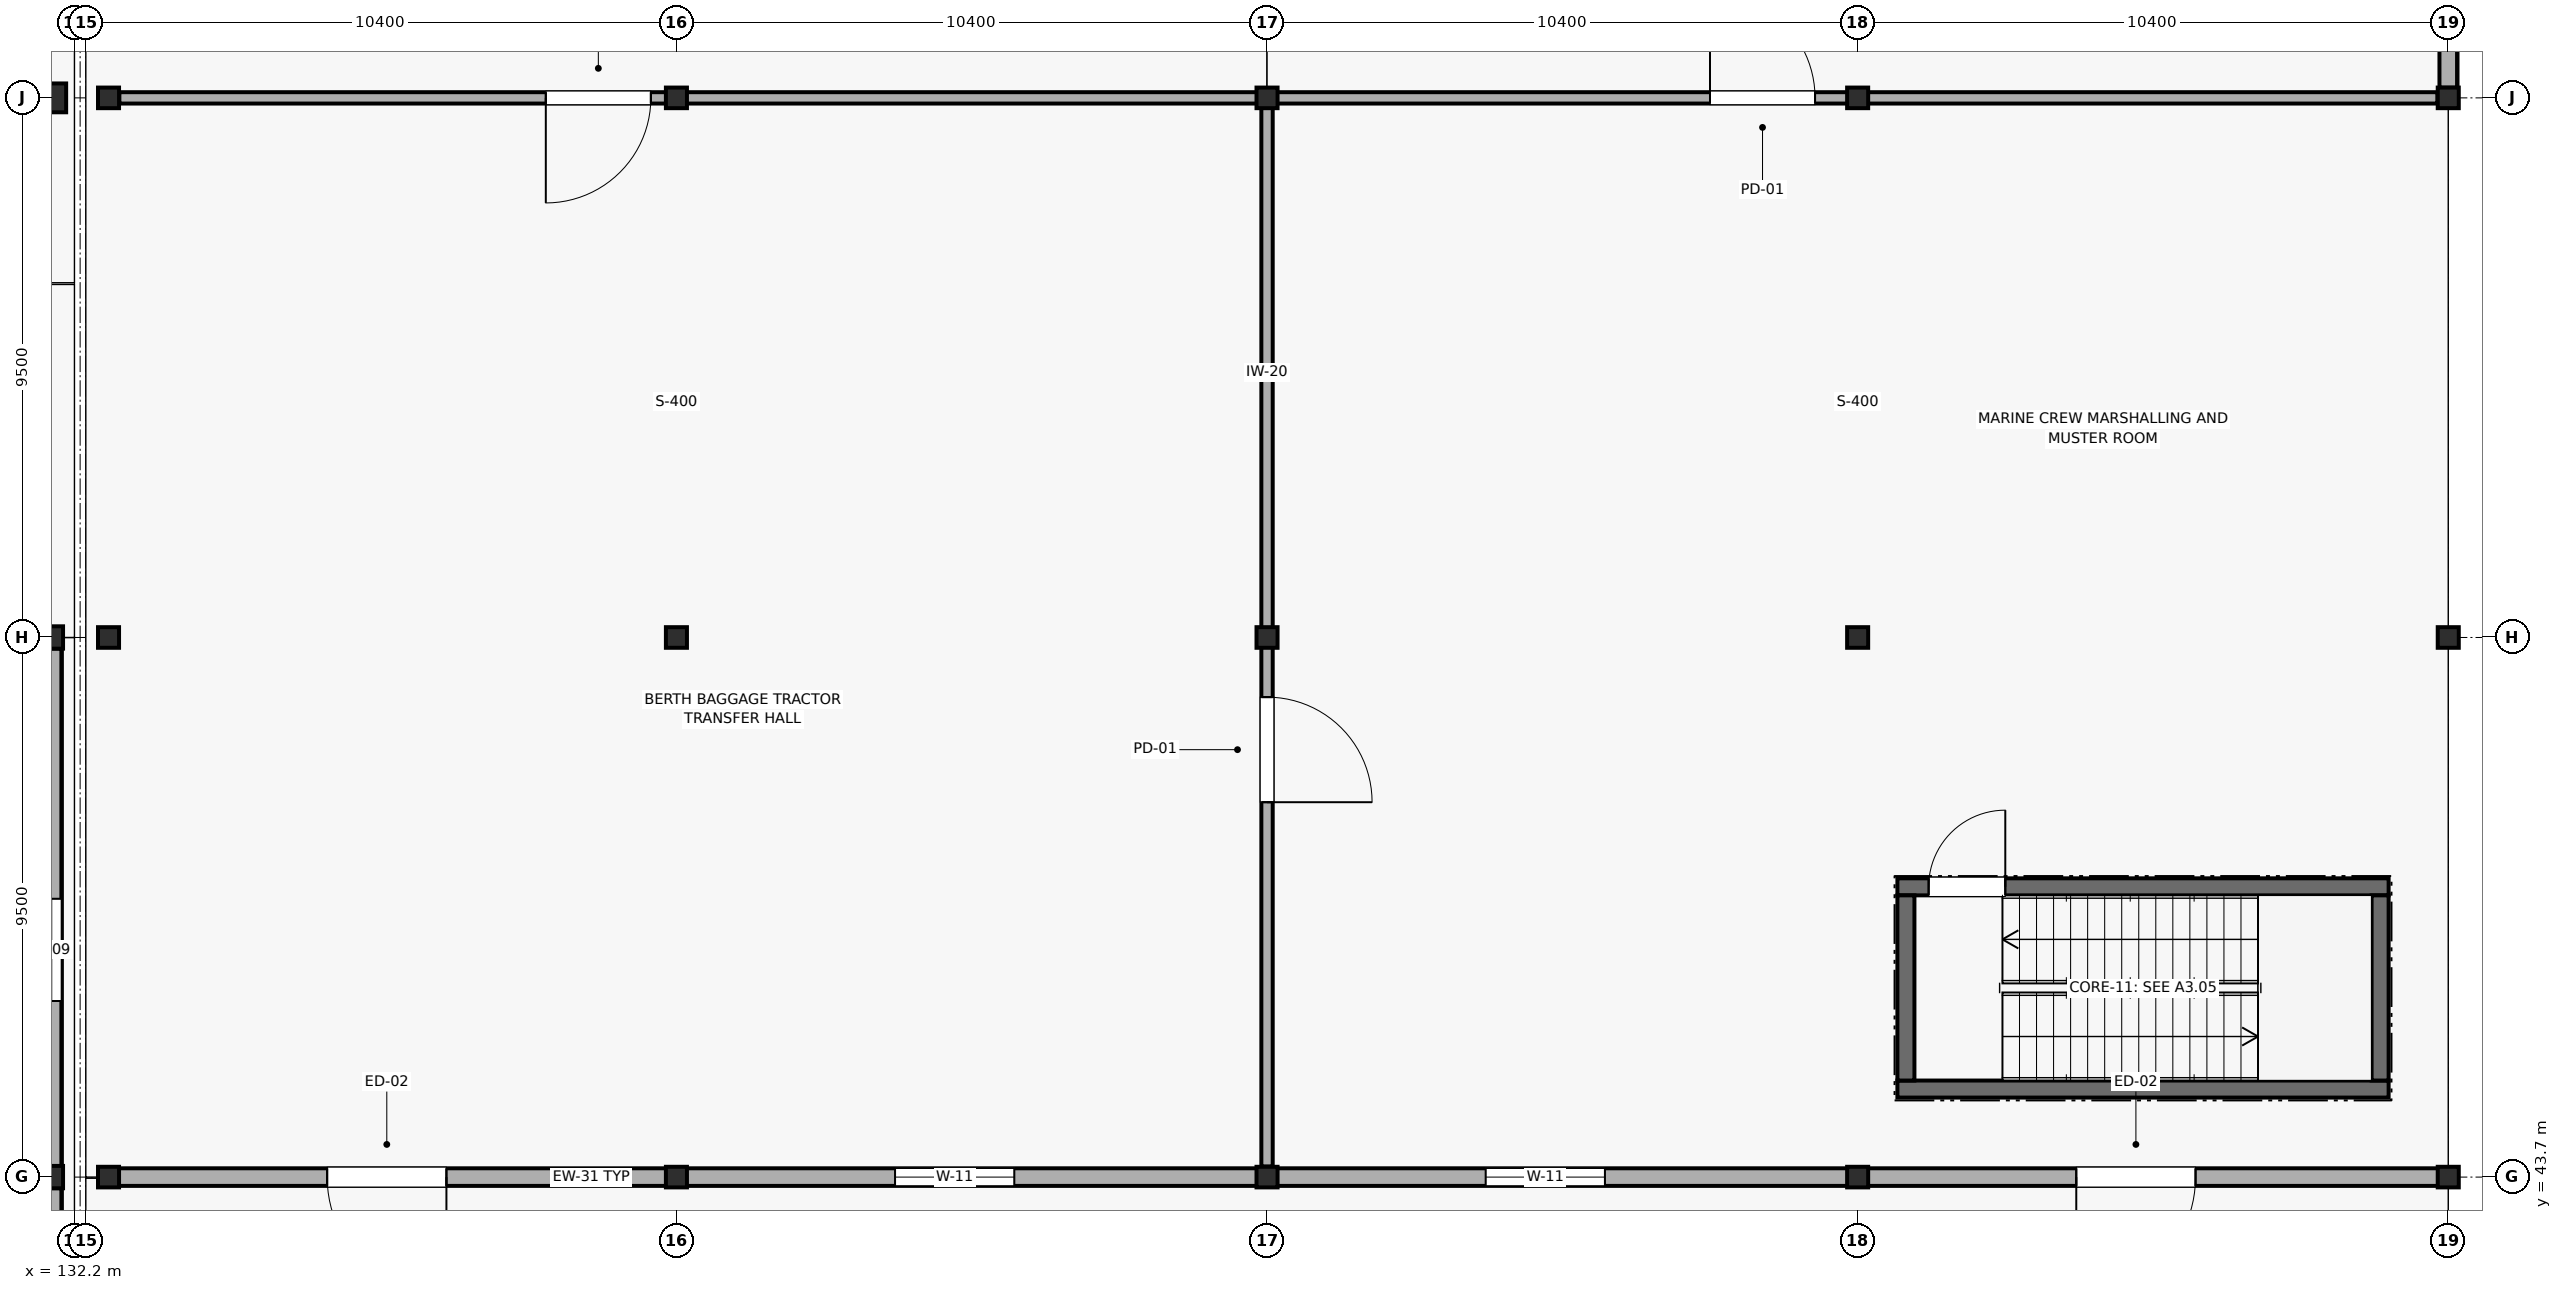
"""IFC4 building model, lengths in metres.
Left out: names, types, materials, properties, quantities, classifications, styles, units other than length and angle.
Written with IfcOpenShell. Run it as: python <this file> out.ifc"""

import sys

from ifc_helpers import new_model, si_unit, direction, frame, frame_2d, origin, origin_2d, place, context, subcontext, project, spatial, rectangle, hollow_circle, i_section, extrude, element, fill, save


model = new_model("IFC4")
c1 = context("Model", 3, precision=1e-05, world=origin(), true_north=direction((0.0, 1.0)))
c2 = subcontext(c1, "Body", "Model", "MODEL_VIEW")
j1 = project(units=[si_unit("LENGTHUNIT", "METRE"), si_unit("PLANEANGLEUNIT", "RADIAN")], contexts=[c1])
p1 = place(None, origin())
s1 = spatial("IfcSite", under=j1, at=p1, CompositionType="ELEMENT")
p2 = place(p1, origin())
s2 = spatial("IfcBuilding", under=s1, at=p2, CompositionType="ELEMENT")
p3 = place(p2, origin())
s3 = spatial("IfcBuildingStorey", under=s2, at=p3, CompositionType="ELEMENT", Elevation=0.0)
p4 = place(p3, frame((131.8, 62.7, 0.0), z_axis=(0.0, 0.0, 1.0), x_axis=(1.0, 0.0, 0.0)))
e1 = element("IfcColumn", 1, at=p4, inside=s3, PredefinedType="COLUMN", context=c2, shape_type="SweptSolid", body=[
    extrude(hollow_circle(Radius=0.254, WallThickness=0.012, at=origin_2d()), origin(), (0.0, 0.0, 1.0), 5.4),
])
for number, where, z_axis, x_axis in (
    (2, (131.8, 43.7, 0.0), (0.0, 0.0, 1.0), (1.0, 0.0, 0.0)),
    (3, (131.8, 53.2, 0.0), (0.0, 0.0, 1.0), (1.0, 0.0, 0.0)),
):
    element("IfcColumn", number, at=place(p3, frame(where, z_axis=z_axis, x_axis=x_axis)), inside=s3, PredefinedType="COLUMN", context=c2, shape_type="SweptSolid", body=[
        extrude(i_section(OverallWidth=0.399, OverallDepth=0.394, WebThickness=0.023, FlangeThickness=0.037, FilletRadius=0.018, at=origin_2d()), origin(), (0.0, 0.0, 1.0), 5.4),
    ])
for number, where, z_axis, x_axis in (
    (4, (132.8, 43.7, 0.0), (0.0, 0.0, 1.0), (1.0, 0.0, 0.0)),
    (5, (132.8, 53.2, 0.0), (0.0, 0.0, 1.0), (1.0, 0.0, 0.0)),
    (6, (132.8, 62.7, 0.0), (0.0, 0.0, 1.0), (1.0, 0.0, 0.0)),
    (7, (142.8, 43.7, 0.0), (0.0, 0.0, 1.0), (1.0, 0.0, 0.0)),
    (8, (142.8, 53.2, 0.0), (0.0, 0.0, 1.0), (1.0, 0.0, 0.0)),
    (9, (142.8, 62.7, 0.0), (0.0, 0.0, 1.0), (1.0, 0.0, 0.0)),
    (10, (153.2, 43.7, 0.0), (0.0, 0.0, 1.0), (1.0, 0.0, 0.0)),
    (11, (153.2, 53.2, 0.0), (0.0, 0.0, 1.0), (1.0, 0.0, 0.0)),
    (12, (153.2, 62.7, 0.0), (0.0, 0.0, 1.0), (1.0, 0.0, 0.0)),
    (13, (163.6, 43.7, 0.0), (0.0, 0.0, 1.0), (1.0, 0.0, 0.0)),
    (14, (163.6, 53.2, 0.0), (0.0, 0.0, 1.0), (1.0, 0.0, 0.0)),
    (15, (163.6, 62.7, 0.0), (0.0, 0.0, 1.0), (1.0, 0.0, 0.0)),
    (16, (174.0, 43.7, 0.0), (0.0, 0.0, 1.0), (1.0, 0.0, 0.0)),
    (17, (174.0, 53.2, 0.0), (0.0, 0.0, 1.0), (1.0, 0.0, 0.0)),
    (18, (174.0, 62.7, 0.0), (0.0, 0.0, 1.0), (1.0, 0.0, 0.0)),
):
    element("IfcColumn", number, at=place(p3, frame(where, z_axis=z_axis, x_axis=x_axis)), inside=s3, PredefinedType="COLUMN", context=c2, shape_type="SweptSolid", body=[
        extrude(i_section(OverallWidth=0.371, OverallDepth=0.363, WebThickness=0.013, FlangeThickness=0.022, FilletRadius=0.018, at=origin_2d()), origin(), (0.0, 0.0, 1.0), 5.4),
    ])
p5 = place(p3, frame((131.8, 34.846, 0.0), z_axis=(0.0, 0.0, 1.0), x_axis=(0.0, 1.0, 0.0)))
e19 = element("IfcWall", 19, at=p5, inside=s3, PredefinedType="SOLIDWALL", context=c2, shape_type="SweptSolid", body=[
    extrude(rectangle(XDim=8.659, YDim=0.34, at=frame_2d((4.33, 0.0))), origin(), (0.0, 0.0, 1.0), 4.483),
])
p6 = place(p5, frame((2.854, 0.0, 1.1)))
e20 = element("IfcOpeningElement", 20, at=p6, cuts=e19, PredefinedType="OPENING", context=c2, shape_type="SweptSolid", body=[
    extrude(rectangle(XDim=1.8, YDim=1.8, at=frame_2d((0.9, 0.9))), frame((0.0, 0.18, 0.0), z_axis=(0.0, -1.0, 0.0), x_axis=(1.0, 0.0, 0.0)), (0.0, 0.0, 1.0), 0.36),
])
p7 = place(p3, frame((131.8, 43.895, 0.0), z_axis=(0.0, 0.0, 1.0), x_axis=(0.0, 1.0, 0.0)))
e21 = element("IfcWall", 21, at=p7, inside=s3, PredefinedType="SOLIDWALL", context=c2, shape_type="SweptSolid", body=[
    extrude(rectangle(XDim=9.11, YDim=0.34, at=frame_2d((4.555, 0.0))), origin(), (0.0, 0.0, 1.0), 4.483),
])
p8 = place(p7, frame((2.905, 0.0, 1.1)))
e22 = element("IfcOpeningElement", 22, at=p8, cuts=e21, PredefinedType="OPENING", context=c2, shape_type="SweptSolid", body=[
    extrude(rectangle(XDim=1.8, YDim=1.8, at=frame_2d((0.9, 0.9))), frame((0.0, 0.18, 0.0), z_axis=(0.0, -1.0, 0.0), x_axis=(1.0, 0.0, 0.0)), (0.0, 0.0, 1.0), 0.36),
])
p9 = place(p3, frame((174.0, 62.88, 0.0), z_axis=(0.0, 0.0, 1.0), x_axis=(0.0, 1.0, 0.0)))
e23 = element("IfcWall", 23, at=p9, inside=s3, PredefinedType="SOLIDWALL", context=c2, shape_type="SweptSolid", body=[
    extrude(rectangle(XDim=7.541, YDim=0.31, at=frame_2d((3.771, 0.0))), origin(), (0.0, 0.0, 1.0), 4.622),
])
p10 = place(p9, frame((0.771, 0.0, 0.0)))
e24 = element("IfcOpeningElement", 24, at=p10, cuts=e23, PredefinedType="OPENING", context=c2, shape_type="SweptSolid", body=[
    extrude(rectangle(XDim=1.4, YDim=2.25, at=frame_2d((0.7, 1.125))), frame((0.0, 0.165, 0.0), z_axis=(0.0, -1.0, 0.0), x_axis=(1.0, 0.0, 0.0)), (0.0, 0.0, 1.0), 0.33),
])
p11 = place(p3, frame((132.805, 43.7, 0.0), z_axis=(0.0, 0.0, 1.0), x_axis=(1.0, 0.0, 0.0)))
e25 = element("IfcWall", 25, at=p11, inside=s3, PredefinedType="SOLIDWALL", context=c2, shape_type="SweptSolid", body=[
    extrude(rectangle(XDim=9.991, YDim=0.31, at=frame_2d((4.995, 0.0))), origin(), (0.0, 0.0, 1.0), 4.558),
])
p12 = place(p11, frame((3.845, 0.0, 0.0)))
e26 = element("IfcOpeningElement", 26, at=p12, cuts=e25, PredefinedType="OPENING", context=c2, shape_type="SweptSolid", body=[
    extrude(rectangle(XDim=2.1, YDim=2.5, at=frame_2d((1.05, 1.25))), frame((0.0, 0.165, 0.0), z_axis=(0.0, -1.0, 0.0), x_axis=(1.0, 0.0, 0.0)), (0.0, 0.0, 1.0), 0.33),
])
p13 = place(p3, frame((142.805, 43.7, 0.0), z_axis=(0.0, 0.0, 1.0), x_axis=(1.0, 0.0, 0.0)))
e27 = element("IfcWall", 27, at=p13, inside=s3, PredefinedType="SOLIDWALL", context=c2, shape_type="SweptSolid", body=[
    extrude(rectangle(XDim=10.391, YDim=0.31, at=frame_2d((5.195, 0.0))), origin(), (0.0, 0.0, 1.0), 4.558),
])
p14 = place(p13, frame((3.845, 0.0, 1.05)))
e28 = element("IfcOpeningElement", 28, at=p14, cuts=e27, PredefinedType="OPENING", context=c2, shape_type="SweptSolid", body=[
    extrude(rectangle(XDim=2.1, YDim=1.8, at=frame_2d((1.05, 0.9))), frame((0.0, 0.165, 0.0), z_axis=(0.0, -1.0, 0.0), x_axis=(1.0, 0.0, 0.0)), (0.0, 0.0, 1.0), 0.33),
])
p15 = place(p3, frame((153.205, 43.7, 0.0), z_axis=(0.0, 0.0, 1.0), x_axis=(1.0, 0.0, 0.0)))
e29 = element("IfcWall", 29, at=p15, inside=s3, PredefinedType="SOLIDWALL", context=c2, shape_type="SweptSolid", body=[
    extrude(rectangle(XDim=10.391, YDim=0.31, at=frame_2d((5.195, 0.0))), origin(), (0.0, 0.0, 1.0), 4.558),
])
p16 = place(p15, frame((3.845, 0.0, 1.05)))
e30 = element("IfcOpeningElement", 30, at=p16, cuts=e29, PredefinedType="OPENING", context=c2, shape_type="SweptSolid", body=[
    extrude(rectangle(XDim=2.1, YDim=1.8, at=frame_2d((1.05, 0.9))), frame((0.0, 0.165, 0.0), z_axis=(0.0, -1.0, 0.0), x_axis=(1.0, 0.0, 0.0)), (0.0, 0.0, 1.0), 0.33),
])
p17 = place(p3, frame((163.604, 43.7, 0.0), z_axis=(0.0, 0.0, 1.0), x_axis=(1.0, 0.0, 0.0)))
e31 = element("IfcWall", 31, at=p17, inside=s3, PredefinedType="SOLIDWALL", context=c2, shape_type="SweptSolid", body=[
    extrude(rectangle(XDim=10.391, YDim=0.31, at=frame_2d((5.195, 0.0))), origin(), (0.0, 0.0, 1.0), 4.558),
])
p18 = place(p17, frame((3.845, 0.0, 0.0)))
e32 = element("IfcOpeningElement", 32, at=p18, cuts=e31, PredefinedType="OPENING", context=c2, shape_type="SweptSolid", body=[
    extrude(rectangle(XDim=2.1, YDim=2.5, at=frame_2d((1.05, 1.25))), frame((0.0, 0.165, 0.0), z_axis=(0.0, -1.0, 0.0), x_axis=(1.0, 0.0, 0.0)), (0.0, 0.0, 1.0), 0.33),
])
p19 = place(p3, frame((164.3, 45.25, 0.0), z_axis=(0.0, 0.0, 1.0), x_axis=(1.0, 0.0, 0.0)))
e33 = element("IfcWall", 33, at=p19, inside=s3, PredefinedType="SHEAR", context=c2, shape_type="SweptSolid", body=[
    extrude(rectangle(XDim=8.65, YDim=0.3, at=frame_2d((4.325, 0.0))), origin(), (0.0, 0.0, 1.0), 5.165),
])
p20 = place(p3, frame((172.95, 48.81, 0.0), z_axis=(0.0, 0.0, 1.0), x_axis=(-1.0, 0.0, 0.0)))
e34 = element("IfcWall", 34, at=p20, inside=s3, PredefinedType="SHEAR", context=c2, shape_type="SweptSolid", body=[
    extrude(rectangle(XDim=8.65, YDim=0.3, at=frame_2d((4.325, 0.0))), origin(), (0.0, 0.0, 1.0), 5.165),
])
p21 = place(p20, frame((6.75, 0.0, 0.0)))
e35 = element("IfcOpeningElement", 35, at=p21, cuts=e34, PredefinedType="OPENING", context=c2, shape_type="SweptSolid", body=[
    extrude(rectangle(XDim=1.35, YDim=2.2, at=frame_2d((0.675, 1.1))), frame((0.0, 0.16, 0.0), z_axis=(0.0, -1.0, 0.0), x_axis=(1.0, 0.0, 0.0)), (0.0, 0.0, 1.0), 0.32),
])
for number, where, z_axis, x_axis in (
    (36, (164.45, 48.66, 0.0), (0.0, 0.0, 1.0), (0.0, -1.0, 0.0)),
    (37, (172.8, 45.4, 0.0), (0.0, 0.0, 1.0), (0.0, 1.0, 0.0)),
):
    element("IfcWall", number, at=place(p3, frame(where, z_axis=z_axis, x_axis=x_axis)), inside=s3, PredefinedType="SHEAR", context=c2, shape_type="SweptSolid", body=[
        extrude(rectangle(XDim=3.26, YDim=0.3, at=frame_2d((1.63, 0.0))), origin(), (0.0, 0.0, 1.0), 5.165),
    ])
p22 = place(p3, frame((132.99, 62.7, 0.0), z_axis=(0.0, 0.0, 1.0), x_axis=(1.0, 0.0, 0.0)))
e38 = element("IfcWall", 38, at=p22, inside=s3, PredefinedType="PARTITIONING", context=c2, shape_type="SweptSolid", body=[
    extrude(rectangle(XDim=40.819, YDim=0.2, at=frame_2d((20.41, 0.0))), origin(), (0.0, 0.0, 1.0), 4.558),
])
p23 = place(p22, frame((7.51, 0.0, 0.0)))
e39 = element("IfcOpeningElement", 39, at=p23, cuts=e38, PredefinedType="OPENING", context=c2, shape_type="SweptSolid", body=[
    extrude(rectangle(XDim=1.85, YDim=2.4, at=frame_2d((0.925, 1.2))), frame((0.0, 0.11, 0.0), z_axis=(0.0, -1.0, 0.0), x_axis=(1.0, 0.0, 0.0)), (0.0, 0.0, 1.0), 0.22),
])
p24 = place(p22, frame((28.01, 0.0, 0.0)))
e40 = element("IfcOpeningElement", 40, at=p24, cuts=e38, PredefinedType="OPENING", context=c2, shape_type="SweptSolid", body=[
    extrude(rectangle(XDim=1.85, YDim=2.4, at=frame_2d((0.925, 1.2))), frame((0.0, 0.11, 0.0), z_axis=(0.0, -1.0, 0.0), x_axis=(1.0, 0.0, 0.0)), (0.0, 0.0, 1.0), 0.22),
])
p25 = place(p3, frame((153.2, 43.887, 0.0), z_axis=(0.0, 0.0, 1.0), x_axis=(0.0, 1.0, 0.0)))
e41 = element("IfcWall", 41, at=p25, inside=s3, PredefinedType="PARTITIONING", context=c2, shape_type="SweptSolid", body=[
    extrude(rectangle(XDim=18.708, YDim=0.2, at=frame_2d((9.354, 0.0))), origin(), (0.0, 0.0, 1.0), 4.622),
])
p26 = place(p25, frame((6.413, 0.0, 0.0)))
e42 = element("IfcOpeningElement", 42, at=p26, cuts=e41, PredefinedType="OPENING", context=c2, shape_type="SweptSolid", body=[
    extrude(rectangle(XDim=1.85, YDim=2.4, at=frame_2d((0.925, 1.2))), frame((0.0, 0.11, 0.0), z_axis=(0.0, -1.0, 0.0), x_axis=(1.0, 0.0, 0.0)), (0.0, 0.0, 1.0), 0.22),
])
p27 = place(p8, origin())
e43 = element("IfcWindow", 43, at=p27, inside=s3, PartitioningType="SINGLE_PANEL", PredefinedType="WINDOW", context=c2, shape_type="SweptSolid", body=[
    extrude(rectangle(XDim=1.8, YDim=1.8, at=frame_2d((0.9, 0.9))), frame((0.0, 0.03, 0.0), z_axis=(0.0, -1.0, 0.0), x_axis=(1.0, 0.0, 0.0)), (0.0, 0.0, 1.0), 0.06),
])
fill(e22, e43)
p28 = place(p12, frame((2.1, 0.0, 0.0), z_axis=(0.0, 0.0, 1.0), x_axis=(-1.0, 0.0, 0.0)))
e44 = element("IfcDoor", 44, at=p28, inside=s3, OperationType="SINGLE_SWING_LEFT", PredefinedType="DOOR", context=c2, shape_type="SweptSolid", body=[
    extrude(rectangle(XDim=2.1, YDim=2.5, at=frame_2d((1.05, 1.25))), frame((0.0, 0.025, 0.0), z_axis=(0.0, -1.0, 0.0), x_axis=(1.0, 0.0, 0.0)), (0.0, 0.0, 1.0), 0.05),
])
fill(e26, e44)
p29 = place(p14, origin())
e45 = element("IfcWindow", 45, at=p29, inside=s3, PartitioningType="SINGLE_PANEL", PredefinedType="WINDOW", context=c2, shape_type="SweptSolid", body=[
    extrude(rectangle(XDim=2.1, YDim=1.8, at=frame_2d((1.05, 0.9))), frame((0.0, 0.03, 0.0), z_axis=(0.0, -1.0, 0.0), x_axis=(1.0, 0.0, 0.0)), (0.0, 0.0, 1.0), 0.06),
])
fill(e28, e45)
p30 = place(p16, origin())
e46 = element("IfcWindow", 46, at=p30, inside=s3, PartitioningType="SINGLE_PANEL", PredefinedType="WINDOW", context=c2, shape_type="SweptSolid", body=[
    extrude(rectangle(XDim=2.1, YDim=1.8, at=frame_2d((1.05, 0.9))), frame((0.0, 0.03, 0.0), z_axis=(0.0, -1.0, 0.0), x_axis=(1.0, 0.0, 0.0)), (0.0, 0.0, 1.0), 0.06),
])
fill(e30, e46)
p31 = place(p18, frame((2.1, 0.0, 0.0), z_axis=(0.0, 0.0, 1.0), x_axis=(-1.0, 0.0, 0.0)))
e47 = element("IfcDoor", 47, at=p31, inside=s3, OperationType="SINGLE_SWING_RIGHT", PredefinedType="DOOR", context=c2, shape_type="SweptSolid", body=[
    extrude(rectangle(XDim=2.1, YDim=2.5, at=frame_2d((1.05, 1.25))), frame((0.0, 0.025, 0.0), z_axis=(0.0, -1.0, 0.0), x_axis=(1.0, 0.0, 0.0)), (0.0, 0.0, 1.0), 0.05),
])
fill(e32, e47)
p32 = place(p21, frame((1.35, 0.0, 0.0), z_axis=(0.0, 0.0, 1.0), x_axis=(-1.0, 0.0, 0.0)))
e48 = element("IfcDoor", 48, at=p32, inside=s3, OperationType="SINGLE_SWING_RIGHT", PredefinedType="DOOR", context=c2, shape_type="SweptSolid", body=[
    extrude(rectangle(XDim=1.35, YDim=2.2, at=frame_2d((0.675, 1.1))), frame((0.0, 0.025, 0.0), z_axis=(0.0, -1.0, 0.0), x_axis=(1.0, 0.0, 0.0)), (0.0, 0.0, 1.0), 0.05),
])
fill(e35, e48)
p33 = place(p23, frame((1.85, 0.0, 0.0), z_axis=(0.0, 0.0, 1.0), x_axis=(-1.0, 0.0, 0.0)))
e49 = element("IfcDoor", 49, at=p33, inside=s3, OperationType="SINGLE_SWING_RIGHT", PredefinedType="DOOR", context=c2, shape_type="SweptSolid", body=[
    extrude(rectangle(XDim=1.85, YDim=2.4, at=frame_2d((0.925, 1.2))), frame((0.0, 0.025, 0.0), z_axis=(0.0, -1.0, 0.0), x_axis=(1.0, 0.0, 0.0)), (0.0, 0.0, 1.0), 0.05),
])
fill(e39, e49)
p34 = place(p24, origin())
e50 = element("IfcDoor", 50, at=p34, inside=s3, OperationType="SINGLE_SWING_LEFT", PredefinedType="DOOR", context=c2, shape_type="SweptSolid", body=[
    extrude(rectangle(XDim=1.85, YDim=2.4, at=frame_2d((0.925, 1.2))), frame((0.0, 0.025, 0.0), z_axis=(0.0, -1.0, 0.0), x_axis=(1.0, 0.0, 0.0)), (0.0, 0.0, 1.0), 0.05),
])
fill(e40, e50)
p35 = place(p26, frame((1.85, 0.0, 0.0), z_axis=(0.0, 0.0, 1.0), x_axis=(-1.0, 0.0, 0.0)))
e51 = element("IfcDoor", 51, at=p35, inside=s3, OperationType="SINGLE_SWING_RIGHT", PredefinedType="DOOR", context=c2, shape_type="SweptSolid", body=[
    extrude(rectangle(XDim=1.85, YDim=2.4, at=frame_2d((0.925, 1.2))), frame((0.0, 0.025, 0.0), z_axis=(0.0, -1.0, 0.0), x_axis=(1.0, 0.0, 0.0)), (0.0, 0.0, 1.0), 0.05),
])
fill(e42, e51)
save(model, sys.argv[1])
